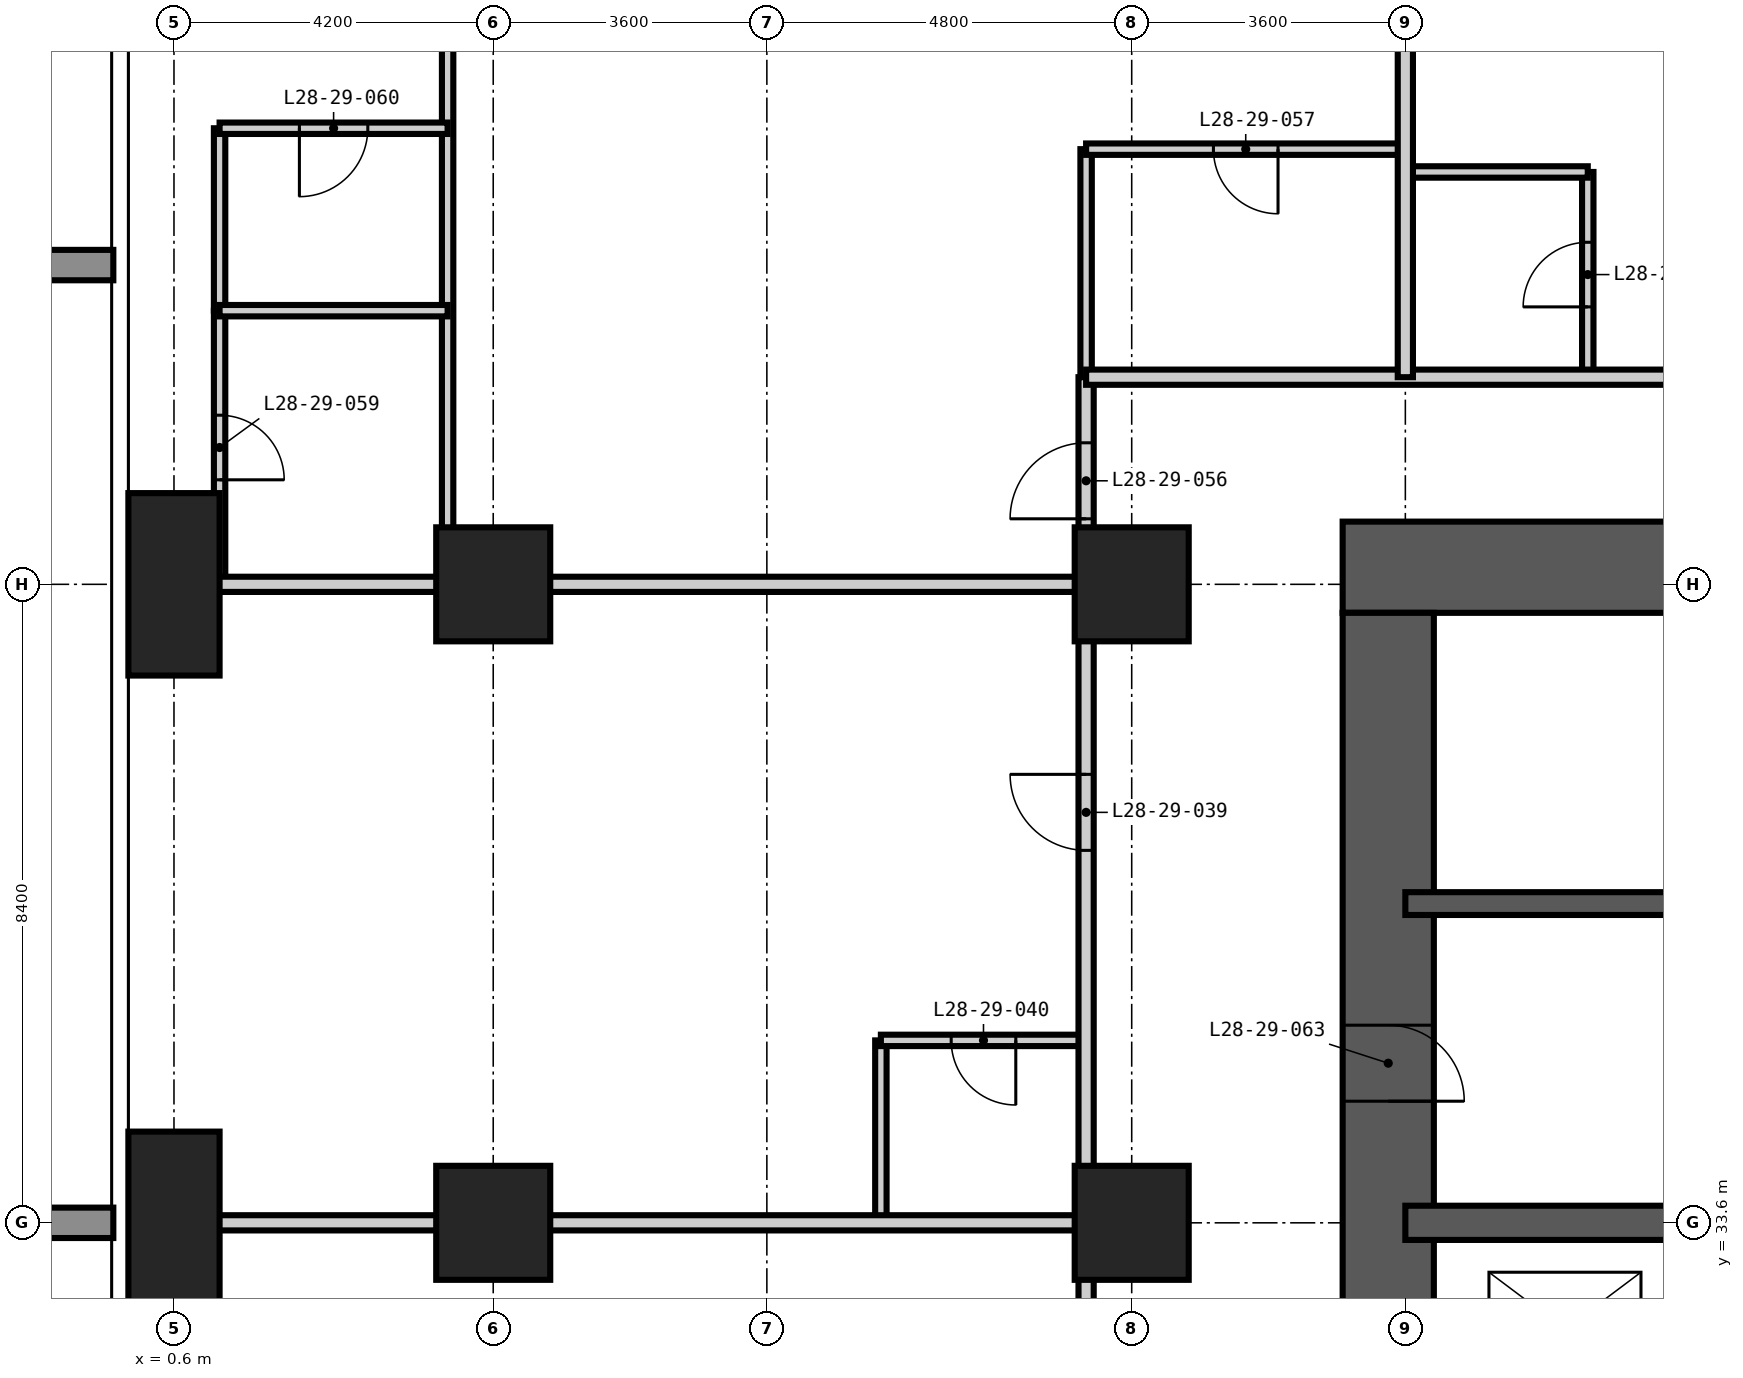
"""IFC4 building model, lengths in metres.
Left out: names, types, materials, properties, quantities, classifications, styles, units other than length and angle.
Written with IfcOpenShell. Run it as: python <this file> out.ifc"""

import sys

from ifc_helpers import new_model, si_unit, direction, frame, frame_2d, origin, origin_2d, place, context, subcontext, project, spatial, rectangle, extrude, element, fill, save


model = new_model("IFC4")
c1 = context("Model", 3, precision=1e-05, world=origin(), true_north=direction((0.0, 1.0)))
c2 = subcontext(c1, "Body", "Model", "MODEL_VIEW")
j1 = project(units=[si_unit("LENGTHUNIT", "METRE"), si_unit("PLANEANGLEUNIT", "RADIAN")], contexts=[c1])
p1 = place(None, origin())
s1 = spatial("IfcSite", under=j1, at=p1, CompositionType="ELEMENT")
p2 = place(p1, origin())
s2 = spatial("IfcBuilding", under=s1, at=p2, CompositionType="ELEMENT")
p3 = place(p2, frame((0.0, 0.0, 111.6)))
s3 = spatial("IfcBuildingStorey", under=s2, at=p3, CompositionType="ELEMENT", Elevation=111.6)
for number, where, z_axis, x_axis in (
    (1, (0.6, 33.6, -0.35), (0.0, 0.0, 1.0), (1.0, 0.0, 0.0)),
    (2, (0.6, 42.0, -0.35), (0.0, 0.0, 1.0), (1.0, 0.0, 0.0)),
):
    element("IfcColumn", number, at=place(p3, frame(where, z_axis=z_axis, x_axis=x_axis)), inside=s3, PredefinedType="COLUMN", context=c2, shape_type="SweptSolid", body=[
        extrude(rectangle(XDim=1.2, YDim=2.4, at=origin_2d()), origin(), (0.0, 0.0, 1.0), 3.6),
    ])
for number, where, z_axis, x_axis in (
    (3, (4.8, 33.6, -0.35), (0.0, 0.0, 1.0), (1.0, 0.0, 0.0)),
    (4, (4.8, 42.0, -0.35), (0.0, 0.0, 1.0), (1.0, 0.0, 0.0)),
    (5, (13.2, 33.6, -0.35), (0.0, 0.0, 1.0), (1.0, 0.0, 0.0)),
    (6, (13.2, 42.0, -0.35), (0.0, 0.0, 1.0), (1.0, 0.0, 0.0)),
):
    element("IfcColumn", number, at=place(p3, frame(where, z_axis=z_axis, x_axis=x_axis)), inside=s3, PredefinedType="COLUMN", context=c2, shape_type="SweptSolid", body=[
        extrude(rectangle(XDim=1.5, YDim=1.5, at=origin_2d()), origin(), (0.0, 0.0, 1.0), 3.6),
    ])
p4 = place(p3, frame((42.825, 42.225, -0.35), z_axis=(0.0, 0.0, 1.0), x_axis=(-1.0, 0.0, 0.0)))
e7 = element("IfcWall", 7, at=p4, inside=s3, PredefinedType="SHEAR", context=c2, shape_type="SweptSolid", body=[
    extrude(rectangle(XDim=26.85, YDim=1.2, at=frame_2d((13.425, 0.0))), origin(), (0.0, 0.0, 1.0), 3.6),
])
p5 = place(p4, frame((21.325, 0.0, 0.35)))
e8 = element("IfcOpeningElement", 8, at=p5, cuts=e7, PredefinedType="OPENING", context=c2, shape_type="SweptSolid", body=[
    extrude(rectangle(XDim=1.0, YDim=2.1, at=frame_2d((0.5, 1.05))), frame((0.0, 0.61, 0.0), z_axis=(0.0, -1.0, 0.0), x_axis=(1.0, 0.0, 0.0)), (0.0, 0.0, 1.0), 1.22),
])
p6 = place(p4, frame((10.725, 0.0, 0.35)))
e9 = element("IfcOpeningElement", 9, at=p6, cuts=e7, PredefinedType="OPENING", context=c2, shape_type="SweptSolid", body=[
    extrude(rectangle(XDim=1.2, YDim=2.2, at=frame_2d((0.6, 1.1))), frame((0.0, 0.61, 0.0), z_axis=(0.0, -1.0, 0.0), x_axis=(1.0, 0.0, 0.0)), (0.0, 0.0, 1.0), 1.22),
])
p7 = place(p3, frame((16.575, 41.625, -0.35), z_axis=(0.0, 0.0, 1.0), x_axis=(0.0, -1.0, 0.0)))
e10 = element("IfcWall", 10, at=p7, inside=s3, PredefinedType="SHEAR", context=c2, shape_type="SweptSolid", body=[
    extrude(rectangle(XDim=24.45, YDim=1.2, at=frame_2d((12.225, 0.0))), origin(), (0.0, 0.0, 1.0), 3.6),
])
p8 = place(p7, frame((11.325, 0.0, 0.35)))
e11 = element("IfcOpeningElement", 11, at=p8, cuts=e10, PredefinedType="OPENING", context=c2, shape_type="SweptSolid", body=[
    extrude(rectangle(XDim=1.8, YDim=2.2, at=frame_2d((0.9, 1.1))), frame((0.0, 0.61, 0.0), z_axis=(0.0, -1.0, 0.0), x_axis=(1.0, 0.0, 0.0)), (0.0, 0.0, 1.0), 1.22),
])
p9 = place(p7, frame((20.125, 0.0, 0.35)))
e12 = element("IfcOpeningElement", 12, at=p9, cuts=e10, PredefinedType="OPENING", context=c2, shape_type="SweptSolid", body=[
    extrude(rectangle(XDim=1.0, YDim=2.1, at=frame_2d((0.5, 1.05))), frame((0.0, 0.61, 0.0), z_axis=(0.0, -1.0, 0.0), x_axis=(1.0, 0.0, 0.0)), (0.0, 0.0, 1.0), 1.22),
])
p10 = place(p7, frame((5.425, 0.0, 0.35)))
e13 = element("IfcOpeningElement", 13, at=p10, cuts=e10, PredefinedType="OPENING", context=c2, shape_type="SweptSolid", body=[
    extrude(rectangle(XDim=1.0, YDim=2.1, at=frame_2d((0.5, 1.05))), frame((0.0, 0.61, 0.0), z_axis=(0.0, -1.0, 0.0), x_axis=(1.0, 0.0, 0.0)), (0.0, 0.0, 1.0), 1.22),
])
p11 = place(p3, frame((16.8, 37.8, -0.35), z_axis=(0.0, 0.0, 1.0), x_axis=(1.0, 0.0, 0.0)))
e14 = element("IfcWall", 14, at=p11, inside=s3, PredefinedType="SHEAR", context=c2, shape_type="SweptSolid", body=[
    extrude(rectangle(XDim=8.4, YDim=0.3, at=frame_2d((4.2, 0.0))), origin(), (0.0, 0.0, 1.0), 3.6),
])
p12 = place(p3, frame((16.8, 33.6, -0.35), z_axis=(0.0, 0.0, 1.0), x_axis=(1.0, 0.0, 0.0)))
e15 = element("IfcWall", 15, at=p12, inside=s3, PredefinedType="SHEAR", context=c2, shape_type="SweptSolid", body=[
    extrude(rectangle(XDim=25.2, YDim=0.45, at=frame_2d((12.6, 0.0))), origin(), (0.0, 0.0, 1.0), 3.6),
])
p13 = place(p12, frame((22.6, 0.0, 0.35)))
e16 = element("IfcOpeningElement", 16, at=p13, cuts=e15, PredefinedType="OPENING", context=c2, shape_type="SweptSolid", body=[
    extrude(rectangle(XDim=1.0, YDim=2.1, at=frame_2d((0.5, 1.05))), frame((0.0, 0.235, 0.0), z_axis=(0.0, -1.0, 0.0), x_axis=(1.0, 0.0, 0.0)), (0.0, 0.0, 1.0), 0.47),
])
p14 = place(p3, frame((1.2, 42.0, 0.0), z_axis=(0.0, 0.0, 1.0), x_axis=(0.0, 1.0, 0.0)))
e17 = element("IfcWall", 17, at=p14, inside=s3, PredefinedType="PARTITIONING", context=c2, shape_type="SweptSolid", body=[
    extrude(rectangle(XDim=3.6, YDim=0.15, at=frame_2d((1.8, 0.0))), origin(), (0.0, 0.0, 1.0), 3.25),
])
p15 = place(p14, frame((1.375, 0.0, 0.0)))
e18 = element("IfcOpeningElement", 18, at=p15, cuts=e17, PredefinedType="OPENING", context=c2, shape_type="SweptSolid", body=[
    extrude(rectangle(XDim=0.85, YDim=2.1, at=frame_2d((0.425, 1.05))), frame((0.0, 0.085, 0.0), z_axis=(0.0, -1.0, 0.0), x_axis=(1.0, 0.0, 0.0)), (0.0, 0.0, 1.0), 0.17),
])
p16 = place(p3, frame((9.9, 33.6, 0.0), z_axis=(0.0, 0.0, 1.0), x_axis=(0.0, 1.0, 0.0)))
e19 = element("IfcWall", 19, at=p16, inside=s3, PredefinedType="PARTITIONING", context=c2, shape_type="SweptSolid", body=[
    extrude(rectangle(XDim=2.4, YDim=0.15, at=frame_2d((1.2, 0.0))), origin(), (0.0, 0.0, 1.0), 3.25),
])
p17 = place(p3, frame((12.6, 44.725, 0.0), z_axis=(0.0, 0.0, 1.0), x_axis=(0.0, 1.0, 0.0)))
e20 = element("IfcWall", 20, at=p17, inside=s3, PredefinedType="PARTITIONING", context=c2, shape_type="SweptSolid", body=[
    extrude(rectangle(XDim=3.0, YDim=0.15, at=frame_2d((1.5, 0.0))), origin(), (0.0, 0.0, 1.0), 3.25),
])
p18 = place(p3, frame((19.2, 44.725, 0.0), z_axis=(0.0, 0.0, 1.0), x_axis=(0.0, 1.0, 0.0)))
e21 = element("IfcWall", 21, at=p18, inside=s3, PredefinedType="PARTITIONING", context=c2, shape_type="SweptSolid", body=[
    extrude(rectangle(XDim=2.7, YDim=0.15, at=frame_2d((1.35, 0.0))), origin(), (0.0, 0.0, 1.0), 3.25),
])
p19 = place(p18, frame((0.925, 0.0, 0.0)))
e22 = element("IfcOpeningElement", 22, at=p19, cuts=e21, PredefinedType="OPENING", context=c2, shape_type="SweptSolid", body=[
    extrude(rectangle(XDim=0.85, YDim=2.1, at=frame_2d((0.425, 1.05))), frame((0.0, 0.085, 0.0), z_axis=(0.0, -1.0, 0.0), x_axis=(1.0, 0.0, 0.0)), (0.0, 0.0, 1.0), 0.17),
])
p20 = place(p3, frame((9.9, 36.0, 0.0), z_axis=(0.0, 0.0, 1.0), x_axis=(1.0, 0.0, 0.0)))
e23 = element("IfcWall", 23, at=p20, inside=s3, PredefinedType="PARTITIONING", context=c2, shape_type="SweptSolid", body=[
    extrude(rectangle(XDim=2.7, YDim=0.15, at=frame_2d((1.35, 0.0))), origin(), (0.0, 0.0, 1.0), 3.25),
])
p21 = place(p20, frame((0.925, 0.0, 0.0)))
e24 = element("IfcOpeningElement", 24, at=p21, cuts=e23, PredefinedType="OPENING", context=c2, shape_type="SweptSolid", body=[
    extrude(rectangle(XDim=0.85, YDim=2.1, at=frame_2d((0.425, 1.05))), frame((0.0, 0.085, 0.0), z_axis=(0.0, -1.0, 0.0), x_axis=(1.0, 0.0, 0.0)), (0.0, 0.0, 1.0), 0.17),
])
p22 = place(p3, frame((16.8, 47.425, 0.0), z_axis=(0.0, 0.0, 1.0), x_axis=(1.0, 0.0, 0.0)))
e25 = element("IfcWall", 25, at=p22, inside=s3, PredefinedType="PARTITIONING", context=c2, shape_type="SweptSolid", body=[
    extrude(rectangle(XDim=2.4, YDim=0.15, at=frame_2d((1.2, 0.0))), origin(), (0.0, 0.0, 1.0), 3.25),
])
p23 = place(p3, frame((12.6, 47.725, 0.0), z_axis=(0.0, 0.0, 1.0), x_axis=(1.0, 0.0, 0.0)))
e26 = element("IfcWall", 26, at=p23, inside=s3, PredefinedType="PARTITIONING", context=c2, shape_type="SweptSolid", body=[
    extrude(rectangle(XDim=4.2, YDim=0.15, at=frame_2d((2.1, 0.0))), origin(), (0.0, 0.0, 1.0), 3.25),
])
p24 = place(p23, frame((1.675, 0.0, 0.0)))
e27 = element("IfcOpeningElement", 27, at=p24, cuts=e26, PredefinedType="OPENING", context=c2, shape_type="SweptSolid", body=[
    extrude(rectangle(XDim=0.85, YDim=2.1, at=frame_2d((0.425, 1.05))), frame((0.0, 0.085, 0.0), z_axis=(0.0, -1.0, 0.0), x_axis=(1.0, 0.0, 0.0)), (0.0, 0.0, 1.0), 0.17),
])
p25 = place(p3, frame((12.6, 12.875, 0.0), z_axis=(0.0, 0.0, 1.0), x_axis=(0.0, 1.0, 0.0)))
e28 = element("IfcWall", 28, at=p25, inside=s3, PredefinedType="PARTITIONING", context=c2, shape_type="SweptSolid", body=[
    extrude(rectangle(XDim=31.85, YDim=0.2, at=frame_2d((15.925, 0.0))), origin(), (0.0, 0.0, 1.0), 3.25),
])
p26 = place(p25, frame((8.825, 0.0, 0.0)))
e29 = element("IfcOpeningElement", 29, at=p26, cuts=e28, PredefinedType="OPENING", context=c2, shape_type="SweptSolid", body=[
    extrude(rectangle(XDim=1.0, YDim=2.2, at=frame_2d((0.5, 1.1))), frame((0.0, 0.11, 0.0), z_axis=(0.0, -1.0, 0.0), x_axis=(1.0, 0.0, 0.0)), (0.0, 0.0, 1.0), 0.22),
])
p27 = place(p25, frame((17.225, 0.0, 0.0)))
e30 = element("IfcOpeningElement", 30, at=p27, cuts=e28, PredefinedType="OPENING", context=c2, shape_type="SweptSolid", body=[
    extrude(rectangle(XDim=1.0, YDim=2.2, at=frame_2d((0.5, 1.1))), frame((0.0, 0.11, 0.0), z_axis=(0.0, -1.0, 0.0), x_axis=(1.0, 0.0, 0.0)), (0.0, 0.0, 1.0), 0.22),
])
p28 = place(p25, frame((25.625, 0.0, 0.0)))
e31 = element("IfcOpeningElement", 31, at=p28, cuts=e28, PredefinedType="OPENING", context=c2, shape_type="SweptSolid", body=[
    extrude(rectangle(XDim=1.0, YDim=2.2, at=frame_2d((0.5, 1.1))), frame((0.0, 0.11, 0.0), z_axis=(0.0, -1.0, 0.0), x_axis=(1.0, 0.0, 0.0)), (0.0, 0.0, 1.0), 0.22),
])
p29 = place(p25, frame((1.463, 0.0, 0.0)))
e32 = element("IfcOpeningElement", 32, at=p29, cuts=e28, PredefinedType="OPENING", context=c2, shape_type="SweptSolid", body=[
    extrude(rectangle(XDim=1.0, YDim=2.2, at=frame_2d((0.5, 1.1))), frame((0.0, 0.11, 0.0), z_axis=(0.0, -1.0, 0.0), x_axis=(1.0, 0.0, 0.0)), (0.0, 0.0, 1.0), 0.22),
])
p30 = place(p25, frame((29.987, 0.0, 0.0)))
e33 = element("IfcOpeningElement", 33, at=p30, cuts=e28, PredefinedType="OPENING", context=c2, shape_type="SweptSolid", body=[
    extrude(rectangle(XDim=1.0, YDim=2.2, at=frame_2d((0.5, 1.1))), frame((0.0, 0.11, 0.0), z_axis=(0.0, -1.0, 0.0), x_axis=(1.0, 0.0, 0.0)), (0.0, 0.0, 1.0), 0.22),
])
p31 = place(p3, frame((12.6, 44.725, 0.0), z_axis=(0.0, 0.0, 1.0), x_axis=(1.0, 0.0, 0.0)))
e34 = element("IfcWall", 34, at=p31, inside=s3, PredefinedType="PARTITIONING", context=c2, shape_type="SweptSolid", body=[
    extrude(rectangle(XDim=32.725, YDim=0.2, at=frame_2d((16.362, 0.0))), origin(), (0.0, 0.0, 1.0), 3.25),
])
p32 = place(p31, frame((9.1, 0.0, 0.0)))
e35 = element("IfcOpeningElement", 35, at=p32, cuts=e34, PredefinedType="OPENING", context=c2, shape_type="SweptSolid", body=[
    extrude(rectangle(XDim=1.0, YDim=2.2, at=frame_2d((0.5, 1.1))), frame((0.0, 0.11, 0.0), z_axis=(0.0, -1.0, 0.0), x_axis=(1.0, 0.0, 0.0)), (0.0, 0.0, 1.0), 0.22),
])
p33 = place(p31, frame((17.5, 0.0, 0.0)))
e36 = element("IfcOpeningElement", 36, at=p33, cuts=e34, PredefinedType="OPENING", context=c2, shape_type="SweptSolid", body=[
    extrude(rectangle(XDim=1.0, YDim=2.2, at=frame_2d((0.5, 1.1))), frame((0.0, 0.11, 0.0), z_axis=(0.0, -1.0, 0.0), x_axis=(1.0, 0.0, 0.0)), (0.0, 0.0, 1.0), 0.22),
])
p34 = place(p31, frame((25.9, 0.0, 0.0)))
e37 = element("IfcOpeningElement", 37, at=p34, cuts=e34, PredefinedType="OPENING", context=c2, shape_type="SweptSolid", body=[
    extrude(rectangle(XDim=1.0, YDim=2.2, at=frame_2d((0.5, 1.1))), frame((0.0, 0.11, 0.0), z_axis=(0.0, -1.0, 0.0), x_axis=(1.0, 0.0, 0.0)), (0.0, 0.0, 1.0), 0.22),
])
p35 = place(p3, frame((16.8, 44.725, 0.0), z_axis=(0.0, 0.0, 1.0), x_axis=(0.0, 1.0, 0.0)))
e38 = element("IfcWall", 38, at=p35, inside=s3, PredefinedType="PARTITIONING", context=c2, shape_type="SweptSolid", body=[
    extrude(rectangle(XDim=9.893, YDim=0.2, at=frame_2d((4.946, 0.0))), origin(), (0.0, 0.0, 1.0), 3.25),
])
for number, where, z_axis, x_axis in (
    (39, (-0.018, 33.6, 0.0), (0.0, 0.0, 1.0), (1.0, 0.0, 0.0)),
    (40, (-0.018, 42.0, 0.0), (0.0, 0.0, 1.0), (1.0, 0.0, 0.0)),
):
    element("IfcWall", number, at=place(p3, frame(where, z_axis=z_axis, x_axis=x_axis)), inside=s3, PredefinedType="PARTITIONING", context=c2, shape_type="SweptSolid", body=[
        extrude(rectangle(XDim=12.618, YDim=0.2, at=frame_2d((6.309, 0.0))), origin(), (0.0, 0.0, 1.0), 3.25),
    ])
p36 = place(p3, frame((1.2, 45.6, 0.0), z_axis=(0.0, 0.0, 1.0), x_axis=(0.0, 1.0, 0.0)))
e41 = element("IfcWall", 41, at=p36, inside=s3, PredefinedType="PARTITIONING", context=c2, shape_type="SweptSolid", body=[
    extrude(rectangle(XDim=2.4, YDim=0.15, at=frame_2d((1.2, 0.0))), origin(), (0.0, 0.0, 1.0), 3.25),
])
p37 = place(p3, frame((4.2, 42.0, 0.0), z_axis=(0.0, 0.0, 1.0), x_axis=(0.0, 1.0, 0.0)))
e42 = element("IfcWall", 42, at=p37, inside=s3, PredefinedType="PARTITIONING", context=c2, shape_type="SweptSolid", body=[
    extrude(rectangle(XDim=12.618, YDim=0.15, at=frame_2d((6.309, 0.0))), origin(), (0.0, 0.0, 1.0), 3.25),
])
p38 = place(p37, frame((9.25, 0.0, 0.0)))
e43 = element("IfcOpeningElement", 43, at=p38, cuts=e42, PredefinedType="OPENING", context=c2, shape_type="SweptSolid", body=[
    extrude(rectangle(XDim=0.9, YDim=2.1, at=frame_2d((0.45, 1.05))), frame((0.0, 0.085, 0.0), z_axis=(0.0, -1.0, 0.0), x_axis=(1.0, 0.0, 0.0)), (0.0, 0.0, 1.0), 0.17),
])
p39 = place(p3, frame((1.2, 45.6, 0.0), z_axis=(0.0, 0.0, 1.0), x_axis=(1.0, 0.0, 0.0)))
e44 = element("IfcWall", 44, at=p39, inside=s3, PredefinedType="PARTITIONING", context=c2, shape_type="SweptSolid", body=[
    extrude(rectangle(XDim=3.0, YDim=0.15, at=frame_2d((1.5, 0.0))), origin(), (0.0, 0.0, 1.0), 3.25),
])
p40 = place(p3, frame((1.2, 48.0, 0.0), z_axis=(0.0, 0.0, 1.0), x_axis=(1.0, 0.0, 0.0)))
e45 = element("IfcWall", 45, at=p40, inside=s3, PredefinedType="PARTITIONING", context=c2, shape_type="SweptSolid", body=[
    extrude(rectangle(XDim=3.0, YDim=0.15, at=frame_2d((1.5, 0.0))), origin(), (0.0, 0.0, 1.0), 3.25),
])
p41 = place(p40, frame((1.05, 0.0, 0.0)))
e46 = element("IfcOpeningElement", 46, at=p41, cuts=e45, PredefinedType="OPENING", context=c2, shape_type="SweptSolid", body=[
    extrude(rectangle(XDim=0.9, YDim=2.1, at=frame_2d((0.45, 1.05))), frame((0.0, 0.085, 0.0), z_axis=(0.0, -1.0, 0.0), x_axis=(1.0, 0.0, 0.0)), (0.0, 0.0, 1.0), 0.17),
])
p42 = place(p19, origin())
e47 = element("IfcDoor", 47, at=p42, inside=s3, OperationType="SINGLE_SWING_LEFT", PredefinedType="DOOR", context=c2, shape_type="SweptSolid", body=[
    extrude(rectangle(XDim=0.85, YDim=2.1, at=frame_2d((0.425, 1.05))), frame((0.0, 0.025, 0.0), z_axis=(0.0, -1.0, 0.0), x_axis=(1.0, 0.0, 0.0)), (0.0, 0.0, 1.0), 0.05),
])
fill(e22, e47)
p43 = place(p28, origin())
e48 = element("IfcDoor", 48, at=p43, inside=s3, OperationType="SINGLE_SWING_RIGHT", PredefinedType="DOOR", context=c2, shape_type="SweptSolid", body=[
    extrude(rectangle(XDim=1.0, YDim=2.2, at=frame_2d((0.5, 1.1))), frame((0.0, 0.025, 0.0), z_axis=(0.0, -1.0, 0.0), x_axis=(1.0, 0.0, 0.0)), (0.0, 0.0, 1.0), 0.05),
])
fill(e31, e48)
p44 = place(p21, frame((0.85, 0.0, 0.0), z_axis=(0.0, 0.0, 1.0), x_axis=(-1.0, 0.0, 0.0)))
e49 = element("IfcDoor", 49, at=p44, inside=s3, OperationType="SINGLE_SWING_LEFT", PredefinedType="DOOR", context=c2, shape_type="SweptSolid", body=[
    extrude(rectangle(XDim=0.85, YDim=2.1, at=frame_2d((0.425, 1.05))), frame((0.0, 0.025, 0.0), z_axis=(0.0, -1.0, 0.0), x_axis=(1.0, 0.0, 0.0)), (0.0, 0.0, 1.0), 0.05),
])
fill(e24, e49)
p45 = place(p30, origin())
e50 = element("IfcDoor", 50, at=p45, inside=s3, OperationType="SINGLE_SWING_LEFT", PredefinedType="DOOR", context=c2, shape_type="SweptSolid", body=[
    extrude(rectangle(XDim=1.0, YDim=2.2, at=frame_2d((0.5, 1.1))), frame((0.0, 0.025, 0.0), z_axis=(0.0, -1.0, 0.0), x_axis=(1.0, 0.0, 0.0)), (0.0, 0.0, 1.0), 0.05),
])
fill(e33, e50)
p46 = place(p24, frame((0.85, 0.0, 0.0), z_axis=(0.0, 0.0, 1.0), x_axis=(-1.0, 0.0, 0.0)))
e51 = element("IfcDoor", 51, at=p46, inside=s3, OperationType="SINGLE_SWING_LEFT", PredefinedType="DOOR", context=c2, shape_type="SweptSolid", body=[
    extrude(rectangle(XDim=0.85, YDim=2.1, at=frame_2d((0.425, 1.05))), frame((0.0, 0.025, 0.0), z_axis=(0.0, -1.0, 0.0), x_axis=(1.0, 0.0, 0.0)), (0.0, 0.0, 1.0), 0.05),
])
fill(e27, e51)
p47 = place(p15, frame((0.85, 0.0, 0.0), z_axis=(0.0, 0.0, 1.0), x_axis=(-1.0, 0.0, 0.0)))
e52 = element("IfcDoor", 52, at=p47, inside=s3, OperationType="SINGLE_SWING_RIGHT", PredefinedType="DOOR", context=c2, shape_type="SweptSolid", body=[
    extrude(rectangle(XDim=0.85, YDim=2.1, at=frame_2d((0.425, 1.05))), frame((0.0, 0.025, 0.0), z_axis=(0.0, -1.0, 0.0), x_axis=(1.0, 0.0, 0.0)), (0.0, 0.0, 1.0), 0.05),
])
fill(e18, e52)
p48 = place(p41, frame((0.9, 0.0, 0.0), z_axis=(0.0, 0.0, 1.0), x_axis=(-1.0, 0.0, 0.0)))
e53 = element("IfcDoor", 53, at=p48, inside=s3, OperationType="SINGLE_SWING_RIGHT", PredefinedType="DOOR", context=c2, shape_type="SweptSolid", body=[
    extrude(rectangle(XDim=0.9, YDim=2.1, at=frame_2d((0.45, 1.05))), frame((0.0, 0.025, 0.0), z_axis=(0.0, -1.0, 0.0), x_axis=(1.0, 0.0, 0.0)), (0.0, 0.0, 1.0), 0.05),
])
fill(e46, e53)
p49 = place(p10, origin())
e54 = element("IfcDoor", 54, at=p49, inside=s3, OperationType="SINGLE_SWING_RIGHT", PredefinedType="DOOR", context=c2, shape_type="SweptSolid", body=[
    extrude(rectangle(XDim=1.0, YDim=2.1, at=frame_2d((0.5, 1.05))), frame((0.0, 0.025, 0.0), z_axis=(0.0, -1.0, 0.0), x_axis=(1.0, 0.0, 0.0)), (0.0, 0.0, 1.0), 0.05),
])
fill(e13, e54)
save(model, sys.argv[1])
